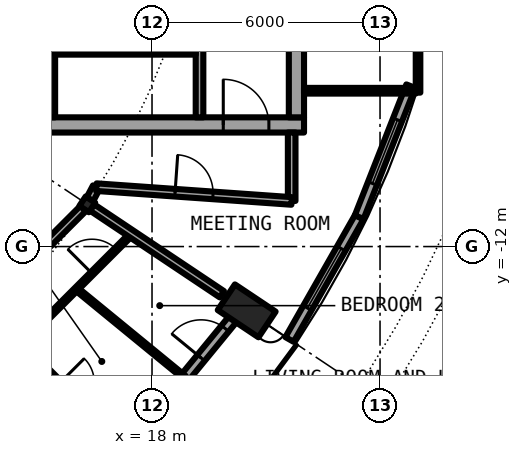
"""IFC4 building model, lengths in metres.
Left out: names, types, materials, properties, quantities, classifications, styles, units other than length and angle.
Written with IfcOpenShell. Run it as: python <this file> out.ifc"""

import sys

from ifc_helpers import new_model, si_unit, direction, frame, frame_2d, origin, origin_2d, place, context, subcontext, project, spatial, rectangle, hollow_circle, i_section, extrude, element, fill, save


model = new_model("IFC4")
c1 = context("Model", 3, precision=1e-05, world=origin(), true_north=direction((0.0, 1.0)))
c2 = subcontext(c1, "Body", "Model", "MODEL_VIEW")
j1 = project(units=[si_unit("LENGTHUNIT", "METRE"), si_unit("PLANEANGLEUNIT", "RADIAN")], contexts=[c1])
p1 = place(None, origin())
s1 = spatial("IfcSite", under=j1, at=p1, CompositionType="ELEMENT")
p2 = place(p1, origin())
s2 = spatial("IfcBuilding", under=s1, at=p2, CompositionType="ELEMENT")
p3 = place(p2, frame((0.0, 0.0, 243.2)))
s3 = spatial("IfcBuildingStorey", under=s2, at=p3, CompositionType="ELEMENT", Elevation=243.2)
p4 = place(p3, frame((21.027, -14.05, 0.242), z_axis=(-0.346875102267, 0.231750495433, 0.908828570905), x_axis=(-0.555530396269, -0.831496228988, 0.0)))
e1 = element("IfcColumn", 1, at=p4, inside=s3, PredefinedType="COLUMN", context=c2, shape_type="SweptSolid", body=[
    extrude(hollow_circle(Radius=0.406, WallThickness=0.03, at=origin_2d()), origin(), (0.0, 0.0, 1.0), 3.09),
])
p5 = place(p3, frame((16.297, -10.889, 0.0), z_axis=(0.0, 0.0, 1.0), x_axis=(0.831469612303, -0.55557023302, 0.0)))
e2 = element("IfcColumn", 2, at=p5, inside=s3, PredefinedType="COLUMN", context=c2, shape_type="SweptSolid", body=[
    extrude(i_section(OverallWidth=0.3, OverallDepth=0.3, WebThickness=0.011, FlangeThickness=0.019, FilletRadius=0.027, at=origin_2d()), origin(), (0.0, 0.0, 1.0), 3.05),
])
p6 = place(p3, frame((17.324, -17.324, 0.0), z_axis=(0.0, 0.0, 1.0), x_axis=(0.634396836208, 0.773007538262, 0.0)))
e3 = element("IfcWall", 3, at=p6, inside=s3, PredefinedType="SOLIDWALL", context=c2, shape_type="SweptSolid", body=[
    extrude(rectangle(XDim=4.803, YDim=0.25, at=frame_2d((2.402, 0.0))), origin(), (0.0, 0.0, 1.0), 2.7),
])
p7 = place(p6, frame((0.304, 0.0, 0.3)))
e4 = element("IfcOpeningElement", 4, at=p7, cuts=e3, PredefinedType="OPENING", context=c2, shape_type="SweptSolid", body=[
    extrude(rectangle(XDim=1.8, YDim=2.1, at=frame_2d((0.9, 1.05))), frame((0.0, 0.135, 0.0), z_axis=(0.0, -1.0, 0.0), x_axis=(1.0, 0.0, 0.0)), (0.0, 0.0, 1.0), 0.27),
])
p8 = place(p6, frame((3.099, 0.0, 0.0)))
e5 = element("IfcOpeningElement", 5, at=p8, cuts=e3, PredefinedType="OPENING", context=c2, shape_type="SweptSolid", body=[
    extrude(rectangle(XDim=1.0, YDim=2.2, at=frame_2d((0.5, 1.1))), frame((0.0, 0.135, 0.0), z_axis=(0.0, -1.0, 0.0), x_axis=(1.0, 0.0, 0.0)), (0.0, 0.0, 1.0), 0.27),
])
p9 = place(p3, frame((21.618, -14.445, 0.0), z_axis=(0.0, 0.0, 1.0), x_axis=(0.495031435966, 0.868875064325, 0.0)))
e6 = element("IfcWall", 6, at=p9, inside=s3, PredefinedType="SOLIDWALL", context=c2, shape_type="SweptSolid", body=[
    extrude(rectangle(XDim=3.705, YDim=0.25, at=frame_2d((1.853, 0.0))), origin(), (0.0, 0.0, 1.0), 2.7),
])
p10 = place(p9, frame((0.952, 0.0, 0.3)))
e7 = element("IfcOpeningElement", 7, at=p10, cuts=e6, PredefinedType="OPENING", context=c2, shape_type="SweptSolid", body=[
    extrude(rectangle(XDim=1.8, YDim=2.1, at=frame_2d((0.9, 1.05))), frame((0.0, 0.135, 0.0), z_axis=(0.0, -1.0, 0.0), x_axis=(1.0, 0.0, 0.0)), (0.0, 0.0, 1.0), 0.27),
])
p11 = place(p3, frame((23.452, -11.226, 0.0), z_axis=(0.0, 0.0, 1.0), x_axis=(0.366351636034, 0.930476479432, 0.0)))
e8 = element("IfcWall", 8, at=p11, inside=s3, PredefinedType="SOLIDWALL", context=c2, shape_type="SweptSolid", body=[
    extrude(rectangle(XDim=3.705, YDim=0.25, at=frame_2d((1.852, 0.0))), origin(), (0.0, 0.0, 1.0), 2.7),
])
p12 = place(p11, frame((0.952, 0.0, 0.3)))
e9 = element("IfcOpeningElement", 9, at=p12, cuts=e8, PredefinedType="OPENING", context=c2, shape_type="SweptSolid", body=[
    extrude(rectangle(XDim=1.8, YDim=2.1, at=frame_2d((0.9, 1.05))), frame((0.0, 0.135, 0.0), z_axis=(0.0, -1.0, 0.0), x_axis=(1.0, 0.0, 0.0)), (0.0, 0.0, 1.0), 0.27),
])
p13 = place(p3, frame((8.6, -8.8, 0.0), z_axis=(0.0, 0.0, 1.0), x_axis=(1.0, 0.0, 0.0)))
e10 = element("IfcWall", 10, at=p13, inside=s3, PredefinedType="SHEAR", context=c2, shape_type="SweptSolid", body=[
    extrude(rectangle(XDim=13.4, YDim=0.4, at=frame_2d((6.7, 0.0))), origin(), (0.0, 0.0, 1.0), 3.05),
])
p14 = place(p13, frame((11.275, 0.0, 0.0)))
e11 = element("IfcOpeningElement", 11, at=p14, cuts=e10, PredefinedType="OPENING", context=c2, shape_type="SweptSolid", body=[
    extrude(rectangle(XDim=1.2, YDim=2.3, at=frame_2d((0.6, 1.15))), frame((0.0, 0.21, 0.0), z_axis=(0.0, -1.0, 0.0), x_axis=(1.0, 0.0, 0.0)), (0.0, 0.0, 1.0), 0.42),
])
p15 = place(p3, frame((21.8, 8.6, 0.0), z_axis=(0.0, 0.0, 1.0), x_axis=(0.0, -1.0, 0.0)))
e12 = element("IfcWall", 12, at=p15, inside=s3, PredefinedType="SHEAR", context=c2, shape_type="SweptSolid", body=[
    extrude(rectangle(XDim=17.2, YDim=0.4, at=frame_2d((8.6, 0.0))), origin(), (0.0, 0.0, 1.0), 3.05),
])
p16 = place(p15, frame((7.7, 0.0, 0.0)))
e13 = element("IfcOpeningElement", 13, at=p16, cuts=e12, PredefinedType="OPENING", context=c2, shape_type="SweptSolid", body=[
    extrude(rectangle(XDim=1.8, YDim=2.3, at=frame_2d((0.9, 1.15))), frame((0.0, 0.21, 0.0), z_axis=(0.0, -1.0, 0.0), x_axis=(1.0, 0.0, 0.0)), (0.0, 0.0, 1.0), 0.42),
])
p17 = place(p3, frame((15.325, -8.6, 0.0), z_axis=(0.0, 0.0, 1.0), x_axis=(0.0, 1.0, 0.0)))
e14 = element("IfcWall", 14, at=p17, inside=s3, PredefinedType="SHEAR", context=c2, shape_type="SweptSolid", body=[
    extrude(rectangle(XDim=3.95, YDim=0.25, at=frame_2d((1.975, 0.0))), origin(), (0.0, 0.0, 1.0), 3.05),
])
p18 = place(p17, frame((2.025, 0.0, 0.0)))
e15 = element("IfcOpeningElement", 15, at=p18, cuts=e14, PredefinedType="OPENING", context=c2, shape_type="SweptSolid", body=[
    extrude(rectangle(XDim=1.2, YDim=2.3, at=frame_2d((0.6, 1.15))), frame((0.0, 0.135, 0.0), z_axis=(0.0, -1.0, 0.0), x_axis=(1.0, 0.0, 0.0)), (0.0, 0.0, 1.0), 0.27),
])
p19 = place(p3, frame((19.25, -8.6, 0.0), z_axis=(0.0, 0.0, 1.0), x_axis=(0.0, 1.0, 0.0)))
e16 = element("IfcWall", 16, at=p19, inside=s3, PredefinedType="SOLIDWALL", context=c2, shape_type="SweptSolid", body=[
    extrude(rectangle(XDim=7.025, YDim=0.2, at=frame_2d((3.513, 0.0))), origin(), (0.0, 0.0, 1.0), 2.7),
])
p20 = place(p19, frame((2.35, 0.0, 0.0)))
e17 = element("IfcOpeningElement", 17, at=p20, cuts=e16, PredefinedType="OPENING", context=c2, shape_type="SweptSolid", body=[
    extrude(rectangle(XDim=1.1, YDim=2.3, at=frame_2d((0.55, 1.15))), frame((0.0, 0.11, 0.0), z_axis=(0.0, -1.0, 0.0), x_axis=(1.0, 0.0, 0.0)), (0.0, 0.0, 1.0), 0.22),
])
p21 = place(p3, frame((15.45, -6.875, 0.0), z_axis=(0.0, 0.0, 1.0), x_axis=(1.0, 0.0, 0.0)))
e18 = element("IfcWall", 18, at=p21, inside=s3, PredefinedType="PARTITIONING", context=c2, shape_type="SweptSolid", body=[
    extrude(rectangle(XDim=3.7, YDim=0.15, at=frame_2d((1.85, 0.0))), origin(), (0.0, 0.0, 1.0), 2.7),
])
p22 = place(p21, frame((1.4, 0.0, 0.0)))
e19 = element("IfcOpeningElement", 19, at=p22, cuts=e18, PredefinedType="OPENING", context=c2, shape_type="SweptSolid", body=[
    extrude(rectangle(XDim=0.9, YDim=2.3, at=frame_2d((0.45, 1.15))), frame((0.0, 0.085, 0.0), z_axis=(0.0, -1.0, 0.0), x_axis=(1.0, 0.0, 0.0)), (0.0, 0.0, 1.0), 0.17),
])
p23 = place(p3, frame((22.0, -7.9, 0.0), z_axis=(0.0, 0.0, 1.0), x_axis=(1.0, 0.0, 0.0)))
e20 = element("IfcWall", 20, at=p23, inside=s3, PredefinedType="PARTITIONING", context=c2, shape_type="SweptSolid", body=[
    extrude(rectangle(XDim=2.94, YDim=0.15, at=frame_2d((1.47, 0.0))), origin(), (0.0, 0.0, 1.0), 2.7),
])
p24 = place(p3, frame((25.0, -7.95, 0.0), z_axis=(0.0, 0.0, 1.0), x_axis=(0.0, 1.0, 0.0)))
e21 = element("IfcWall", 21, at=p24, inside=s3, PredefinedType="PARTITIONING", context=c2, shape_type="SweptSolid", body=[
    extrude(rectangle(XDim=15.9, YDim=0.12, at=frame_2d((7.95, 0.0))), origin(), (0.0, 0.0, 1.0), 2.7),
])
p25 = place(p24, frame((0.95, 0.0, 0.1)))
e22 = element("IfcOpeningElement", 22, at=p25, cuts=e21, PredefinedType="OPENING", context=c2, shape_type="SweptSolid", body=[
    extrude(rectangle(XDim=14.0, YDim=2.35, at=frame_2d((7.0, 1.175))), frame((0.0, 0.07, 0.0), z_axis=(0.0, -1.0, 0.0), x_axis=(1.0, 0.0, 0.0)), (0.0, 0.0, 1.0), 0.14),
])
p26 = place(p3, frame((21.675, -10.8, 0.0), z_axis=(0.0, 0.0, 1.0), x_axis=(0.0, 1.0, 0.0)))
e23 = element("IfcWall", 23, at=p26, inside=s3, PredefinedType="PARTITIONING", context=c2, shape_type="SweptSolid", body=[
    extrude(rectangle(XDim=1.8, YDim=0.2, at=frame_2d((0.9, 0.0))), origin(), (0.0, 0.0, 1.0), 2.7),
])
p27 = place(p3, frame((14.559, -14.569, 0.0), z_axis=(0.0, 0.0, 1.0), x_axis=(0.707106781187, 0.707106781187, 0.0)))
e24 = element("IfcWall", 24, at=p27, inside=s3, PredefinedType="PARTITIONING", context=c2, shape_type="SweptSolid", body=[
    extrude(rectangle(XDim=4.111, YDim=0.1, at=frame_2d((2.056, 0.0))), origin(), (0.0, 0.0, 1.0), 2.7),
])
p28 = place(p27, frame((2.633, 0.0, 0.0)))
e25 = element("IfcOpeningElement", 25, at=p28, cuts=e24, PredefinedType="OPENING", context=c2, shape_type="SweptSolid", body=[
    extrude(rectangle(XDim=0.9, YDim=2.3, at=frame_2d((0.45, 1.15))), frame((0.0, 0.06, 0.0), z_axis=(0.0, -1.0, 0.0), x_axis=(1.0, 0.0, 0.0)), (0.0, 0.0, 1.0), 0.12),
])
p29 = place(p3, frame((16.367, -10.756, 0.0), z_axis=(0.0, 0.0, 1.0), x_axis=(0.465802239822, 0.884888848035, 0.0)))
e26 = element("IfcWall", 26, at=p29, inside=s3, PredefinedType="PARTITIONING", context=c2, shape_type="SweptSolid", body=[
    extrude(rectangle(XDim=0.361, YDim=0.2, at=frame_2d((0.18, 0.0))), origin(), (0.0, 0.0, 1.0), 2.7),
])
p30 = place(p3, frame((10.997, -16.189, 0.0), z_axis=(0.0, 0.0, 1.0), x_axis=(0.707106781187, 0.707106781187, 0.0)))
e27 = element("IfcWall", 27, at=p30, inside=s3, PredefinedType="PARTITIONING", context=c2, shape_type="SweptSolid", body=[
    extrude(rectangle(XDim=7.343, YDim=0.2, at=frame_2d((3.671, 0.0))), origin(), (0.0, 0.0, 1.0), 2.45),
])
p31 = place(p30, frame((4.127, 0.0, 0.0)))
e28 = element("IfcOpeningElement", 28, at=p31, cuts=e27, PredefinedType="OPENING", context=c2, shape_type="SweptSolid", body=[
    extrude(rectangle(XDim=1.0, YDim=2.3, at=frame_2d((0.5, 1.15))), frame((0.0, 0.11, 0.0), z_axis=(0.0, -1.0, 0.0), x_axis=(1.0, 0.0, 0.0)), (0.0, 0.0, 1.0), 0.22),
])
p32 = place(p3, frame((16.535, -10.437, 0.0), z_axis=(0.0, 0.0, 1.0), x_axis=(0.997515141784, -0.070452408845, 0.0)))
e29 = element("IfcWall", 29, at=p32, inside=s3, PredefinedType="PARTITIONING", context=c2, shape_type="SweptSolid", body=[
    extrude(rectangle(XDim=5.153, YDim=0.2, at=frame_2d((2.576, 0.0))), origin(), (0.0, 0.0, 1.0), 2.7),
])
p33 = place(p32, frame((2.076, 0.0, 0.0)))
e30 = element("IfcOpeningElement", 30, at=p33, cuts=e29, PredefinedType="OPENING", context=c2, shape_type="SweptSolid", body=[
    extrude(rectangle(XDim=1.0, YDim=2.3, at=frame_2d((0.5, 1.15))), frame((0.0, 0.11, 0.0), z_axis=(0.0, -1.0, 0.0), x_axis=(1.0, 0.0, 0.0)), (0.0, 0.0, 1.0), 0.22),
])
p34 = place(p3, frame((14.564, -14.564, 0.0), z_axis=(0.0, 0.0, 1.0), x_axis=(0.707106781187, -0.707106781187, 0.0)))
e31 = element("IfcWall", 31, at=p34, inside=s3, PredefinedType="PARTITIONING", context=c2, shape_type="SweptSolid", body=[
    extrude(rectangle(XDim=3.779, YDim=0.1, at=frame_2d((1.89, 0.0))), origin(), (0.0, 0.0, 1.0), 2.7),
])
p35 = place(p34, frame((1.439, 0.0, 0.0)))
e32 = element("IfcOpeningElement", 32, at=p35, cuts=e31, PredefinedType="OPENING", context=c2, shape_type="SweptSolid", body=[
    extrude(rectangle(XDim=0.9, YDim=2.3, at=frame_2d((0.45, 1.15))), frame((0.0, 0.06, 0.0), z_axis=(0.0, -1.0, 0.0), x_axis=(1.0, 0.0, 0.0)), (0.0, 0.0, 1.0), 0.12),
])
p36 = place(p3, frame((16.012, -13.115, 0.0), z_axis=(0.0, 0.0, 1.0), x_axis=(0.773640700514, -0.633624546958, 0.0)))
e33 = element("IfcWall", 33, at=p36, inside=s3, PredefinedType="PARTITIONING", context=c2, shape_type="SweptSolid", body=[
    extrude(rectangle(XDim=3.677, YDim=0.1, at=frame_2d((1.839, 0.0))), origin(), (0.0, 0.0, 1.0), 2.7),
])
p37 = place(p3, frame((16.422, -10.972, 0.0), z_axis=(0.0, 0.0, 1.0), x_axis=(0.831400632185, -0.55567345519, 0.0)))
e34 = element("IfcWall", 34, at=p37, inside=s3, PredefinedType="PARTITIONING", context=c2, shape_type="SweptSolid", body=[
    extrude(rectangle(XDim=4.108, YDim=0.2, at=frame_2d((2.054, 0.0))), origin(), (0.0, 0.0, 1.0), 2.7),
])
p38 = place(p8, origin())
e35 = element("IfcDoor", 35, at=p38, inside=s3, OperationType="SINGLE_SWING_LEFT", PredefinedType="DOOR", context=c2, shape_type="SweptSolid", body=[
    extrude(rectangle(XDim=1.0, YDim=2.2, at=frame_2d((0.5, 1.1))), frame((0.0, 0.025, 0.0), z_axis=(0.0, -1.0, 0.0), x_axis=(1.0, 0.0, 0.0)), (0.0, 0.0, 1.0), 0.05),
])
fill(e5, e35)
p39 = place(p10, origin())
e36 = element("IfcWindow", 36, at=p39, inside=s3, PartitioningType="SINGLE_PANEL", PredefinedType="WINDOW", context=c2, shape_type="SweptSolid", body=[
    extrude(rectangle(XDim=1.8, YDim=2.1, at=frame_2d((0.9, 1.05))), frame((0.0, 0.03, 0.0), z_axis=(0.0, -1.0, 0.0), x_axis=(1.0, 0.0, 0.0)), (0.0, 0.0, 1.0), 0.06),
])
fill(e7, e36)
p40 = place(p12, origin())
e37 = element("IfcWindow", 37, at=p40, inside=s3, PartitioningType="SINGLE_PANEL", PredefinedType="WINDOW", context=c2, shape_type="SweptSolid", body=[
    extrude(rectangle(XDim=1.8, YDim=2.1, at=frame_2d((0.9, 1.05))), frame((0.0, 0.03, 0.0), z_axis=(0.0, -1.0, 0.0), x_axis=(1.0, 0.0, 0.0)), (0.0, 0.0, 1.0), 0.06),
])
fill(e9, e37)
p41 = place(p22, origin())
e38 = element("IfcDoor", 38, at=p41, inside=s3, OperationType="SINGLE_SWING_LEFT", PredefinedType="DOOR", context=c2, shape_type="SweptSolid", body=[
    extrude(rectangle(XDim=0.9, YDim=2.3, at=frame_2d((0.45, 1.15))), frame((0.0, 0.025, 0.0), z_axis=(0.0, -1.0, 0.0), x_axis=(1.0, 0.0, 0.0)), (0.0, 0.0, 1.0), 0.05),
])
fill(e19, e38)
p42 = place(p14, origin())
e39 = element("IfcDoor", 39, at=p42, inside=s3, OperationType="SINGLE_SWING_LEFT", PredefinedType="DOOR", context=c2, shape_type="SweptSolid", body=[
    extrude(rectangle(XDim=1.2, YDim=2.3, at=frame_2d((0.6, 1.15))), frame((0.0, 0.025, 0.0), z_axis=(0.0, -1.0, 0.0), x_axis=(1.0, 0.0, 0.0)), (0.0, 0.0, 1.0), 0.05),
])
fill(e11, e39)
p43 = place(p25, origin())
e40 = element("IfcWindow", 40, at=p43, inside=s3, PartitioningType="SINGLE_PANEL", PredefinedType="WINDOW", context=c2, shape_type="SweptSolid", body=[
    extrude(rectangle(XDim=14.0, YDim=2.35, at=frame_2d((7.0, 1.175))), frame((0.0, 0.03, 0.0), z_axis=(0.0, -1.0, 0.0), x_axis=(1.0, 0.0, 0.0)), (0.0, 0.0, 1.0), 0.06),
])
fill(e22, e40)
p44 = place(p28, origin())
e41 = element("IfcDoor", 41, at=p44, inside=s3, OperationType="SINGLE_SWING_RIGHT", PredefinedType="DOOR", context=c2, shape_type="SweptSolid", body=[
    extrude(rectangle(XDim=0.9, YDim=2.3, at=frame_2d((0.45, 1.15))), frame((0.0, 0.025, 0.0), z_axis=(0.0, -1.0, 0.0), x_axis=(1.0, 0.0, 0.0)), (0.0, 0.0, 1.0), 0.05),
])
fill(e25, e41)
p45 = place(p33, origin())
e42 = element("IfcDoor", 42, at=p45, inside=s3, OperationType="SINGLE_SWING_LEFT", PredefinedType="DOOR", context=c2, shape_type="SweptSolid", body=[
    extrude(rectangle(XDim=1.0, YDim=2.3, at=frame_2d((0.5, 1.15))), frame((0.0, 0.025, 0.0), z_axis=(0.0, -1.0, 0.0), x_axis=(1.0, 0.0, 0.0)), (0.0, 0.0, 1.0), 0.05),
])
fill(e30, e42)
save(model, sys.argv[1])
